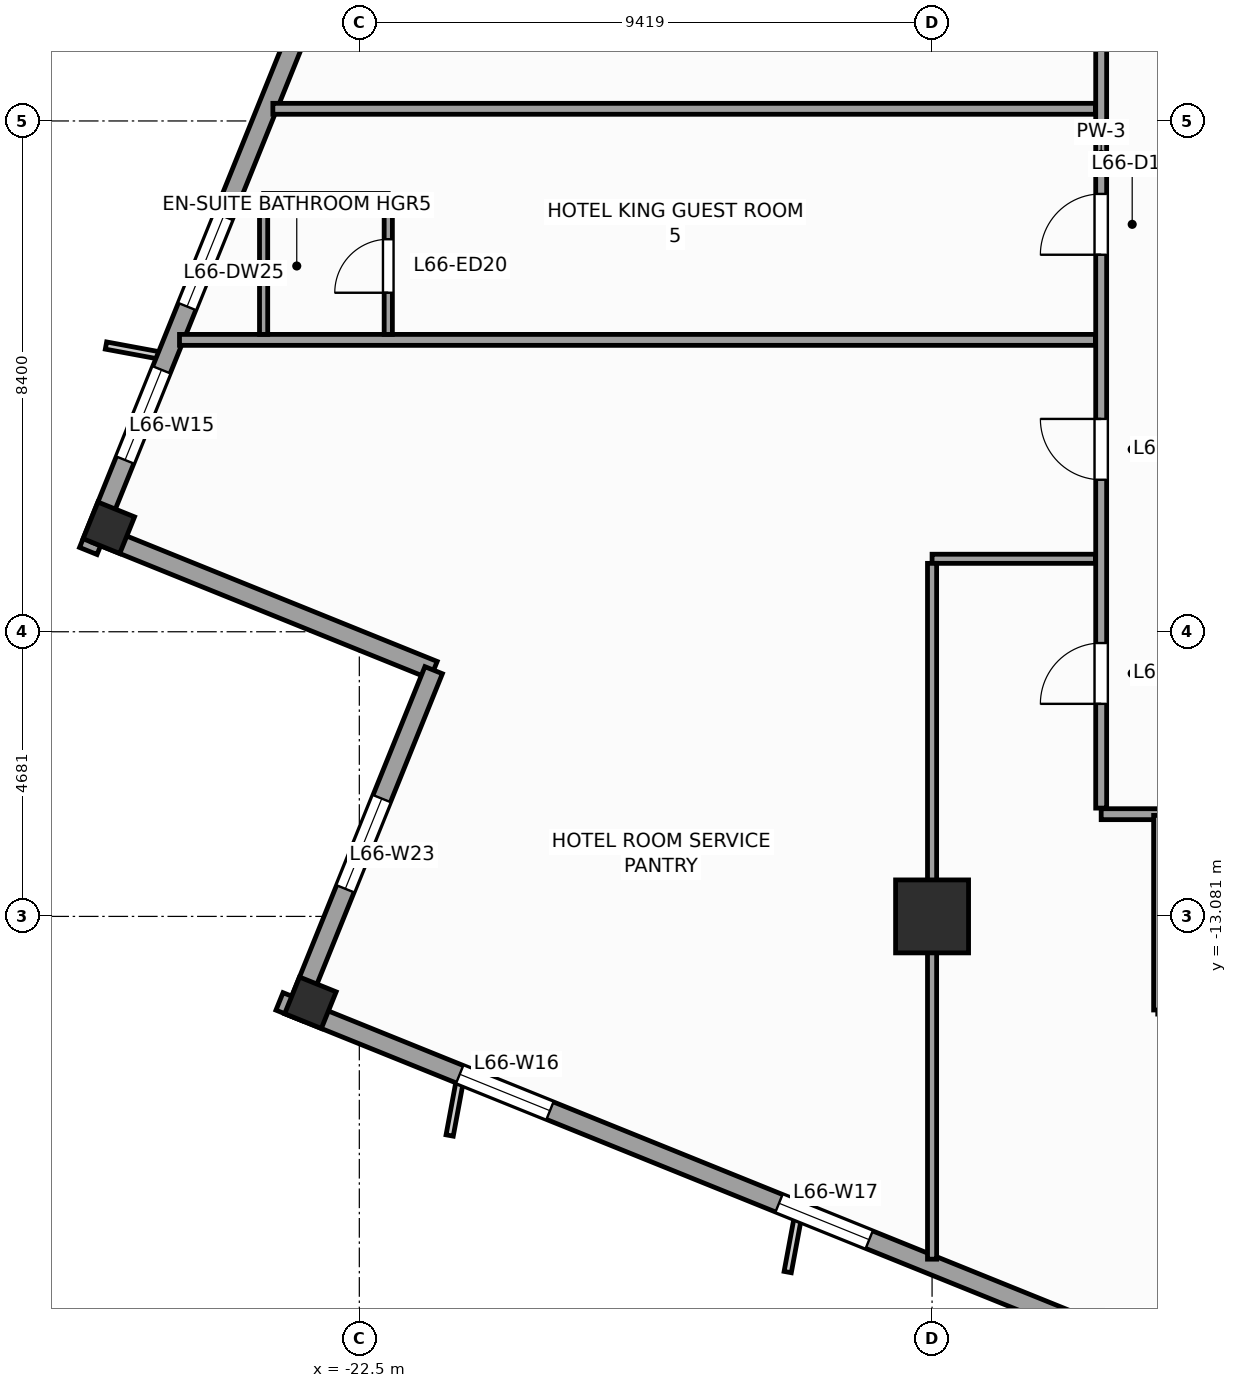
"""IFC4 building model, lengths in metres.
Left out: names, types, materials, properties, quantities, classifications, styles, units other than length and angle.
Written with IfcOpenShell. Run it as: python <this file> out.ifc"""

import sys

from ifc_helpers import new_model, si_unit, direction, frame, frame_2d, origin, origin_2d, place, context, subcontext, project, spatial, rectangle, extrude, source, transform, mapped, element, fill, save


model = new_model("IFC4")
c1 = context("Model", 3, precision=1e-05, world=origin(), true_north=direction((0.0, 1.0)))
c2 = subcontext(c1, "Body", "Model", "MODEL_VIEW")
j1 = project(units=[si_unit("LENGTHUNIT", "METRE"), si_unit("PLANEANGLEUNIT", "RADIAN")], contexts=[c1])
p1 = place(None, origin())
s1 = spatial("IfcSite", under=j1, at=p1, CompositionType="ELEMENT")
p2 = place(p1, origin())
s2 = spatial("IfcBuilding", under=s1, at=p2, CompositionType="ELEMENT")
p3 = place(p2, frame((0.0, 0.0, 272.4)))
s3 = spatial("IfcBuildingStorey", under=s2, at=p3, CompositionType="ELEMENT", Elevation=272.4)
m1 = source(origin(), c2, "Body", "SweptSolid", [
    extrude(rectangle(XDim=1.2, YDim=1.2, at=origin_2d()), origin(), (0.0, 0.0, 1.0), 3.6),
])
p4 = place(p3, frame((-13.081, -13.081, 0.0), z_axis=(0.0, 0.0, 1.0), x_axis=(1.0, 0.0, 0.0)))
e1 = element("IfcColumn", 1, at=p4, inside=s3, PredefinedType="COLUMN", context=c2, shape_type="MappedRepresentation", body=[
    mapped(m1, transform((0.0, 0.0, 0.0), scale=1.0)),
])
m2 = source(origin(), c2, "Body", "SweptSolid", [
    extrude(rectangle(XDim=0.65, YDim=0.65, at=origin_2d()), origin(), (0.0, 0.0, 1.0), 3.6),
])
for number, where, z_axis, x_axis in (
    (2, (-26.62, -6.69, 0.0), (0.0, 0.0, 1.0), (0.375, 0.927, 0.0)),
    (3, (-23.304, -14.501, 0.0), (0.0, 0.0, 1.0), (0.375, 0.927, 0.0)),
):
    element("IfcColumn", number, at=place(p3, frame(where, z_axis=z_axis, x_axis=x_axis)), inside=s3, PredefinedType="COLUMN", context=c2, shape_type="MappedRepresentation", body=[
        mapped(m2, transform((0.0, 0.0, 0.0), scale=1.0)),
    ])
p5 = place(p3, frame((-14.479, 23.813, 0.0), z_axis=(0.0, 0.0, 1.0), x_axis=(-0.374609557019, -0.927182657188, 0.0)))
e4 = element("IfcWall", 4, at=p5, inside=s3, PredefinedType="STANDARD", context=c2, shape_type="SweptSolid", body=[
    extrude(rectangle(XDim=33.31, YDim=0.31, at=frame_2d((16.655, 0.0))), origin(), (0.0, 0.0, 1.0), 2.75),
])
p6 = place(p5, frame((10.53, 0.0, 0.0)))
e5 = element("IfcOpeningElement", 5, at=p6, cuts=e4, PredefinedType="OPENING", context=c2, shape_type="SweptSolid", body=[
    extrude(rectangle(XDim=1.05, YDim=2.25, at=frame_2d((0.525, 1.125))), frame((0.0, 0.165, 0.0), z_axis=(0.0, -1.0, 0.0), x_axis=(1.0, 0.0, 0.0)), (0.0, 0.0, 1.0), 0.33),
])
p7 = place(p5, frame((3.197, 0.0, 0.47)))
e6 = element("IfcOpeningElement", 6, at=p7, cuts=e4, PredefinedType="OPENING", context=c2, shape_type="SweptSolid", body=[
    extrude(rectangle(XDim=1.6, YDim=2.1, at=frame_2d((0.8, 1.05))), frame((0.0, 0.165, 0.0), z_axis=(0.0, -1.0, 0.0), x_axis=(1.0, 0.0, 0.0)), (0.0, 0.0, 1.0), 0.33),
])
p8 = place(p5, frame((7.36, 0.0, 0.47)))
e7 = element("IfcOpeningElement", 7, at=p8, cuts=e4, PredefinedType="OPENING", context=c2, shape_type="SweptSolid", body=[
    extrude(rectangle(XDim=1.6, YDim=2.1, at=frame_2d((0.8, 1.05))), frame((0.0, 0.165, 0.0), z_axis=(0.0, -1.0, 0.0), x_axis=(1.0, 0.0, 0.0)), (0.0, 0.0, 1.0), 0.33),
])
p9 = place(p5, frame((14.439, 0.0, 0.47)))
e8 = element("IfcOpeningElement", 8, at=p9, cuts=e4, PredefinedType="OPENING", context=c2, shape_type="SweptSolid", body=[
    extrude(rectangle(XDim=1.6, YDim=2.1, at=frame_2d((0.8, 1.05))), frame((0.0, 0.165, 0.0), z_axis=(0.0, -1.0, 0.0), x_axis=(1.0, 0.0, 0.0)), (0.0, 0.0, 1.0), 0.33),
])
p10 = place(p5, frame((21.851, 0.0, 0.47)))
e9 = element("IfcOpeningElement", 9, at=p10, cuts=e4, PredefinedType="OPENING", context=c2, shape_type="SweptSolid", body=[
    extrude(rectangle(XDim=1.6, YDim=2.1, at=frame_2d((0.8, 1.05))), frame((0.0, 0.165, 0.0), z_axis=(0.0, -1.0, 0.0), x_axis=(1.0, 0.0, 0.0)), (0.0, 0.0, 1.0), 0.33),
])
p11 = place(p5, frame((30.097, 0.0, 0.47)))
e10 = element("IfcOpeningElement", 10, at=p11, cuts=e4, PredefinedType="OPENING", context=c2, shape_type="SweptSolid", body=[
    extrude(rectangle(XDim=1.6, YDim=2.1, at=frame_2d((0.8, 1.05))), frame((0.0, 0.165, 0.0), z_axis=(0.0, -1.0, 0.0), x_axis=(1.0, 0.0, 0.0)), (0.0, 0.0, 1.0), 0.33),
])
p12 = place(p5, frame((27.374, 0.0, 0.47)))
e11 = element("IfcOpeningElement", 11, at=p12, cuts=e4, PredefinedType="OPENING", context=c2, shape_type="SweptSolid", body=[
    extrude(rectangle(XDim=1.6, YDim=2.1, at=frame_2d((0.8, 1.05))), frame((0.0, 0.165, 0.0), z_axis=(0.0, -1.0, 0.0), x_axis=(1.0, 0.0, 0.0)), (0.0, 0.0, 1.0), 0.33),
])
p13 = place(p3, frame((-26.841, -6.784, 0.0), z_axis=(0.0, 0.0, 1.0), x_axis=(0.927171722085, -0.374636620962, 0.0)))
e12 = element("IfcWall", 12, at=p13, inside=s3, PredefinedType="STANDARD", context=c2, shape_type="SweptSolid", body=[
    extrude(rectangle(XDim=6.0, YDim=0.31, at=frame_2d((3.0, 0.0))), origin(), (0.0, 0.0, 1.0), 2.65),
])
p14 = place(p3, frame((-21.278, -9.032, 0.0), z_axis=(0.0, 0.0, 1.0), x_axis=(-0.374602739196, -0.927185411764, 0.0)))
e13 = element("IfcWall", 13, at=p14, inside=s3, PredefinedType="STANDARD", context=c2, shape_type="SweptSolid", body=[
    extrude(rectangle(XDim=6.155, YDim=0.31, at=frame_2d((3.078, 0.0))), origin(), (0.0, 0.0, 1.0), 3.35),
])
p15 = place(p14, frame((2.278, 0.0, 0.47)))
e14 = element("IfcOpeningElement", 14, at=p15, cuts=e13, PredefinedType="OPENING", context=c2, shape_type="SweptSolid", body=[
    extrude(rectangle(XDim=1.6, YDim=2.1, at=frame_2d((0.8, 1.05))), frame((0.0, 0.165, 0.0), z_axis=(0.0, -1.0, 0.0), x_axis=(1.0, 0.0, 0.0)), (0.0, 0.0, 1.0), 0.33),
])
p16 = place(p3, frame((-23.813, -14.479, 0.0), z_axis=(0.0, 0.0, 1.0), x_axis=(0.927182657188, -0.374609557019, 0.0)))
e15 = element("IfcWall", 15, at=p16, inside=s3, PredefinedType="STANDARD", context=c2, shape_type="SweptSolid", body=[
    extrude(rectangle(XDim=33.31, YDim=0.31, at=frame_2d((16.655, 0.0))), origin(), (0.0, 0.0, 1.0), 2.75),
])
p17 = place(p16, frame((3.197, 0.0, 0.47)))
e16 = element("IfcOpeningElement", 16, at=p17, cuts=e15, PredefinedType="OPENING", context=c2, shape_type="SweptSolid", body=[
    extrude(rectangle(XDim=1.6, YDim=2.1, at=frame_2d((0.8, 1.05))), frame((0.0, 0.165, 0.0), z_axis=(0.0, -1.0, 0.0), x_axis=(1.0, 0.0, 0.0)), (0.0, 0.0, 1.0), 0.33),
])
p18 = place(p16, frame((8.86, 0.0, 0.47)))
e17 = element("IfcOpeningElement", 17, at=p18, cuts=e15, PredefinedType="OPENING", context=c2, shape_type="SweptSolid", body=[
    extrude(rectangle(XDim=1.6, YDim=2.1, at=frame_2d((0.8, 1.05))), frame((0.0, 0.165, 0.0), z_axis=(0.0, -1.0, 0.0), x_axis=(1.0, 0.0, 0.0)), (0.0, 0.0, 1.0), 0.33),
])
p19 = place(p16, frame((14.439, 0.0, 0.47)))
e18 = element("IfcOpeningElement", 18, at=p19, cuts=e15, PredefinedType="OPENING", context=c2, shape_type="SweptSolid", body=[
    extrude(rectangle(XDim=1.6, YDim=2.1, at=frame_2d((0.8, 1.05))), frame((0.0, 0.165, 0.0), z_axis=(0.0, -1.0, 0.0), x_axis=(1.0, 0.0, 0.0)), (0.0, 0.0, 1.0), 0.33),
])
p20 = place(p16, frame((22.601, 0.0, 0.47)))
e19 = element("IfcOpeningElement", 19, at=p20, cuts=e15, PredefinedType="OPENING", context=c2, shape_type="SweptSolid", body=[
    extrude(rectangle(XDim=1.6, YDim=2.1, at=frame_2d((0.8, 1.05))), frame((0.0, 0.165, 0.0), z_axis=(0.0, -1.0, 0.0), x_axis=(1.0, 0.0, 0.0)), (0.0, 0.0, 1.0), 0.33),
])
p21 = place(p16, frame((27.097, 0.0, 0.47)))
e20 = element("IfcOpeningElement", 20, at=p21, cuts=e15, PredefinedType="OPENING", context=c2, shape_type="SweptSolid", body=[
    extrude(rectangle(XDim=1.6, YDim=2.1, at=frame_2d((0.8, 1.05))), frame((0.0, 0.165, 0.0), z_axis=(0.0, -1.0, 0.0), x_axis=(1.0, 0.0, 0.0)), (0.0, 0.0, 1.0), 0.33),
])
p22 = place(p3, frame((-10.3, -11.4, 0.0), z_axis=(0.0, 0.0, 1.0), x_axis=(1.0, 0.0, 0.0)))
e21 = element("IfcWall", 21, at=p22, inside=s3, PredefinedType="PARTITIONING", context=c2, shape_type="SweptSolid", body=[
    extrude(rectangle(XDim=21.7, YDim=0.18, at=frame_2d((10.85, 0.0))), origin(), (0.0, 0.0, 1.0), 3.35),
])
p23 = place(p22, frame((1.605, 0.0, 0.0)))
e22 = element("IfcOpeningElement", 22, at=p23, cuts=e21, PredefinedType="OPENING", context=c2, shape_type="SweptSolid", body=[
    extrude(rectangle(XDim=0.95, YDim=2.1, at=frame_2d((0.475, 1.05))), frame((0.0, 0.1, 0.0), z_axis=(0.0, -1.0, 0.0), x_axis=(1.0, 0.0, 0.0)), (0.0, 0.0, 1.0), 0.2),
])
p24 = place(p22, frame((17.236, 0.0, 0.0)))
e23 = element("IfcOpeningElement", 23, at=p24, cuts=e21, PredefinedType="OPENING", context=c2, shape_type="SweptSolid", body=[
    extrude(rectangle(XDim=1.0, YDim=2.15, at=frame_2d((0.5, 1.075))), frame((0.0, 0.1, 0.0), z_axis=(0.0, -1.0, 0.0), x_axis=(1.0, 0.0, 0.0)), (0.0, 0.0, 1.0), 0.2),
])
p25 = place(p22, frame((9.8, 0.0, 0.0)))
e24 = element("IfcOpeningElement", 24, at=p25, cuts=e21, PredefinedType="OPENING", context=c2, shape_type="SweptSolid", body=[
    extrude(rectangle(XDim=1.0, YDim=2.15, at=frame_2d((0.5, 1.075))), frame((0.0, 0.1, 0.0), z_axis=(0.0, -1.0, 0.0), x_axis=(1.0, 0.0, 0.0)), (0.0, 0.0, 1.0), 0.2),
])
p26 = place(p3, frame((-10.3, -11.3, 0.0), z_axis=(0.0, 0.0, 1.0), x_axis=(0.0, 1.0, 0.0)))
e25 = element("IfcWall", 25, at=p26, inside=s3, PredefinedType="PARTITIONING", context=c2, shape_type="SweptSolid", body=[
    extrude(rectangle(XDim=21.5, YDim=0.18, at=frame_2d((10.75, 0.0))), origin(), (0.0, 0.0, 1.0), 3.35),
])
p27 = place(p26, frame((12.9, 0.0, 0.0)))
e26 = element("IfcOpeningElement", 26, at=p27, cuts=e25, PredefinedType="OPENING", context=c2, shape_type="SweptSolid", body=[
    extrude(rectangle(XDim=1.0, YDim=2.15, at=frame_2d((0.5, 1.075))), frame((0.0, 0.1, 0.0), z_axis=(0.0, -1.0, 0.0), x_axis=(1.0, 0.0, 0.0)), (0.0, 0.0, 1.0), 0.2),
])
p28 = place(p26, frame((17.736, 0.0, 0.0)))
e27 = element("IfcOpeningElement", 27, at=p28, cuts=e25, PredefinedType="OPENING", context=c2, shape_type="SweptSolid", body=[
    extrude(rectangle(XDim=1.0, YDim=2.15, at=frame_2d((0.5, 1.075))), frame((0.0, 0.1, 0.0), z_axis=(0.0, -1.0, 0.0), x_axis=(1.0, 0.0, 0.0)), (0.0, 0.0, 1.0), 0.2),
])
p29 = place(p26, frame((1.714, 0.0, 0.0)))
e28 = element("IfcOpeningElement", 28, at=p29, cuts=e25, PredefinedType="OPENING", context=c2, shape_type="SweptSolid", body=[
    extrude(rectangle(XDim=1.0, YDim=2.15, at=frame_2d((0.5, 1.075))), frame((0.0, 0.1, 0.0), z_axis=(0.0, -1.0, 0.0), x_axis=(1.0, 0.0, 0.0)), (0.0, 0.0, 1.0), 0.2),
])
p30 = place(p26, frame((5.4, 0.0, 0.0)))
e29 = element("IfcOpeningElement", 29, at=p30, cuts=e25, PredefinedType="OPENING", context=c2, shape_type="SweptSolid", body=[
    extrude(rectangle(XDim=1.0, YDim=2.15, at=frame_2d((0.5, 1.075))), frame((0.0, 0.1, 0.0), z_axis=(0.0, -1.0, 0.0), x_axis=(1.0, 0.0, 0.0)), (0.0, 0.0, 1.0), 0.2),
])
p31 = place(p26, frame((9.1, 0.0, 0.0)))
e30 = element("IfcOpeningElement", 30, at=p31, cuts=e25, PredefinedType="OPENING", context=c2, shape_type="SweptSolid", body=[
    extrude(rectangle(XDim=1.0, YDim=2.15, at=frame_2d((0.5, 1.075))), frame((0.0, 0.1, 0.0), z_axis=(0.0, -1.0, 0.0), x_axis=(1.0, 0.0, 0.0)), (0.0, 0.0, 1.0), 0.2),
])
p32 = place(p3, frame((-10.395, -3.6, 0.0), z_axis=(0.0, 0.0, 1.0), x_axis=(-1.0, 0.0, 0.0)))
e31 = element("IfcWall", 31, at=p32, inside=s3, PredefinedType="PARTITIONING", context=c2, shape_type="SweptSolid", body=[
    extrude(rectangle(XDim=15.062, YDim=0.18, at=frame_2d((7.531, 0.0))), origin(), (0.0, 0.0, 1.0), 3.35),
])
p33 = place(p3, frame((-10.395, 0.2, 0.0), z_axis=(0.0, 0.0, 1.0), x_axis=(-1.0, 0.0, 0.0)))
e32 = element("IfcWall", 32, at=p33, inside=s3, PredefinedType="PARTITIONING", context=c2, shape_type="SweptSolid", body=[
    extrude(rectangle(XDim=13.527, YDim=0.18, at=frame_2d((6.763, 0.0))), origin(), (0.0, 0.0, 1.0), 3.35),
])
p34 = place(p3, frame((-10.395, -7.2, 0.0), z_axis=(0.0, 0.0, 1.0), x_axis=(-1.0, 0.0, 0.0)))
e33 = element("IfcWall", 33, at=p34, inside=s3, PredefinedType="PARTITIONING", context=c2, shape_type="SweptSolid", body=[
    extrude(rectangle(XDim=2.686, YDim=0.15, at=frame_2d((1.343, 0.0))), origin(), (0.0, 0.0, 1.0), 3.35),
])
p35 = place(p3, frame((-13.081, -7.275, 0.0), z_axis=(0.0, 0.0, 1.0), x_axis=(0.0, -1.0, 0.0)))
e34 = element("IfcWall", 34, at=p35, inside=s3, PredefinedType="PARTITIONING", context=c2, shape_type="SweptSolid", body=[
    extrude(rectangle(XDim=11.443, YDim=0.15, at=frame_2d((5.721, 0.0))), origin(), (0.0, 0.0, 1.0), 2.45),
])
p36 = place(p3, frame((-9.37, -14.62, 0.0), z_axis=(0.0, 0.0, 1.0), x_axis=(0.0, 1.0, 0.0)))
e35 = element("IfcWall", 35, at=p36, inside=s3, PredefinedType="PARTITIONING", context=c2, shape_type="SweptSolid", body=[
    extrude(rectangle(XDim=3.2, YDim=0.135, at=frame_2d((1.6, 0.0))), origin(), (0.0, 0.0, 1.0), 3.35),
])
p37 = place(p3, frame((-22.024, -3.51, 0.0), z_axis=(0.0, 0.0, 1.0), x_axis=(0.0, 1.0, 0.0)))
e36 = element("IfcWall", 36, at=p37, inside=s3, PredefinedType="PARTITIONING", context=c2, shape_type="SweptSolid", body=[
    extrude(rectangle(XDim=2.25, YDim=0.135, at=frame_2d((1.125, 0.0))), origin(), (0.0, 0.0, 1.0), 3.35),
])
p38 = place(p37, frame((0.685, 0.0, 0.0)))
e37 = element("IfcOpeningElement", 37, at=p38, cuts=e36, PredefinedType="OPENING", context=c2, shape_type="SweptSolid", body=[
    extrude(rectangle(XDim=0.88, YDim=2.1, at=frame_2d((0.44, 1.05))), frame((0.0, 0.078, 0.0), z_axis=(0.0, -1.0, 0.0), x_axis=(1.0, 0.0, 0.0)), (0.0, 0.0, 1.0), 0.155),
])
p39 = place(p3, frame((-24.074, -1.26, 0.0), z_axis=(0.0, 0.0, 1.0), x_axis=(1.0, 0.0, 0.0)))
e38 = element("IfcWall", 38, at=p39, inside=s3, PredefinedType="PARTITIONING", context=c2, shape_type="SweptSolid", body=[
    extrude(rectangle(XDim=2.05, YDim=0.135, at=frame_2d((1.025, 0.0))), origin(), (0.0, 0.0, 1.0), 3.35),
])
p40 = place(p3, frame((-24.074, -3.51, 0.0), z_axis=(0.0, 0.0, 1.0), x_axis=(0.0, 1.0, 0.0)))
e39 = element("IfcWall", 39, at=p40, inside=s3, PredefinedType="PARTITIONING", context=c2, shape_type="SweptSolid", body=[
    extrude(rectangle(XDim=2.25, YDim=0.135, at=frame_2d((1.125, 0.0))), origin(), (0.0, 0.0, 1.0), 3.35),
])
m3 = source(origin(), c2, "Body", "SweptSolid", [
    extrude(rectangle(XDim=1.6, YDim=2.1, at=frame_2d((0.8, 1.05))), frame((0.0, 0.03, 0.0), z_axis=(0.0, -1.0, 0.0), x_axis=(1.0, 0.0, 0.0)), (0.0, 0.0, 1.0), 0.06),
])
p41 = place(p11, origin())
e40 = element("IfcWindow", 40, at=p41, inside=s3, PartitioningType="SINGLE_PANEL", PredefinedType="WINDOW", context=c2, shape_type="MappedRepresentation", body=[
    mapped(m3, transform((0.0, 0.0, 0.0), scale=1.0)),
])
fill(e10, e40)
p42 = place(p17, origin())
e41 = element("IfcWindow", 41, at=p42, inside=s3, PartitioningType="SINGLE_PANEL", PredefinedType="WINDOW", context=c2, shape_type="MappedRepresentation", body=[
    mapped(m3, transform((0.0, 0.0, 0.0), scale=1.0)),
])
fill(e16, e41)
p43 = place(p18, origin())
e42 = element("IfcWindow", 42, at=p43, inside=s3, PartitioningType="SINGLE_PANEL", PredefinedType="WINDOW", context=c2, shape_type="MappedRepresentation", body=[
    mapped(m3, transform((0.0, 0.0, 0.0), scale=1.0)),
])
fill(e17, e42)
p44 = place(p15, origin())
e43 = element("IfcWindow", 43, at=p44, inside=s3, PartitioningType="SINGLE_PANEL", PredefinedType="WINDOW", context=c2, shape_type="MappedRepresentation", body=[
    mapped(m3, transform((0.0, 0.0, 0.0), scale=1.0)),
])
fill(e14, e43)
m4 = source(origin(), c2, "Body", "SweptSolid", [
    extrude(rectangle(XDim=1.0, YDim=2.15, at=frame_2d((0.5, 1.075))), frame((0.0, 0.025, 0.0), z_axis=(0.0, -1.0, 0.0), x_axis=(1.0, 0.0, 0.0)), (0.0, 0.0, 1.0), 0.05),
])
p45 = place(p29, origin())
e44 = element("IfcDoor", 44, at=p45, inside=s3, OperationType="SINGLE_SWING_LEFT", PredefinedType="DOOR", context=c2, shape_type="MappedRepresentation", body=[
    mapped(m4, transform((0.0, 0.0, 0.0), scale=1.0)),
])
fill(e28, e44)
p46 = place(p30, origin())
e45 = element("IfcDoor", 45, at=p46, inside=s3, OperationType="SINGLE_SWING_RIGHT", PredefinedType="DOOR", context=c2, shape_type="MappedRepresentation", body=[
    mapped(m4, transform((0.0, 0.0, 0.0), scale=1.0)),
])
fill(e29, e45)
p47 = place(p31, origin())
e46 = element("IfcDoor", 46, at=p47, inside=s3, OperationType="SINGLE_SWING_LEFT", PredefinedType="DOOR", context=c2, shape_type="MappedRepresentation", body=[
    mapped(m4, transform((0.0, 0.0, 0.0), scale=1.0)),
])
fill(e30, e46)
m5 = source(origin(), c2, "Body", "SweptSolid", [
    extrude(rectangle(XDim=0.88, YDim=2.1, at=frame_2d((0.44, 1.05))), frame((0.0, 0.025, 0.0), z_axis=(0.0, -1.0, 0.0), x_axis=(1.0, 0.0, 0.0)), (0.0, 0.0, 1.0), 0.05),
])
p48 = place(p38, origin())
e47 = element("IfcDoor", 47, at=p48, inside=s3, OperationType="SINGLE_SWING_LEFT", PredefinedType="DOOR", context=c2, shape_type="MappedRepresentation", body=[
    mapped(m5, transform((0.0, 0.0, 0.0), scale=1.0)),
])
fill(e37, e47)
p49 = place(p12, origin())
e48 = element("IfcWindow", 48, at=p49, inside=s3, PartitioningType="SINGLE_PANEL", PredefinedType="WINDOW", context=c2, shape_type="MappedRepresentation", body=[
    mapped(m3, transform((0.0, 0.0, 0.0), scale=1.0)),
])
fill(e11, e48)
save(model, sys.argv[1])
